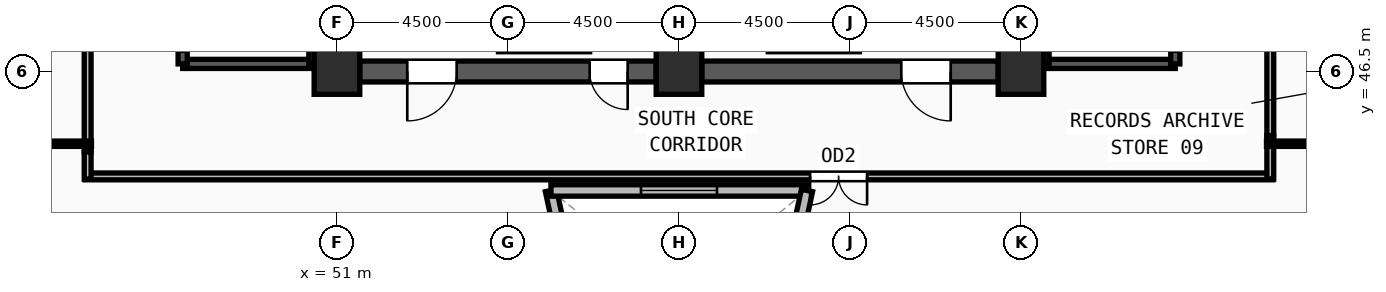
"""IFC4 building model, lengths in metres.
Left out: names, types, materials, properties, quantities, classifications, styles, units other than length and angle.
Written with IfcOpenShell. Run it as: python <this file> out.ifc"""

import sys

from ifc_helpers import new_model, si_unit, direction, frame, frame_2d, origin, origin_2d, place, context, subcontext, project, spatial, rectangle, extrude, source, transform, mapped, element, fill, save


model = new_model("IFC4")
c1 = context("Model", 3, precision=1e-05, world=origin(), true_north=direction((0.0, 1.0)))
c2 = subcontext(c1, "Body", "Model", "MODEL_VIEW")
j1 = project(units=[si_unit("LENGTHUNIT", "METRE"), si_unit("PLANEANGLEUNIT", "RADIAN")], contexts=[c1])
p1 = place(None, origin())
s1 = spatial("IfcSite", under=j1, at=p1, CompositionType="ELEMENT")
p2 = place(p1, origin())
s2 = spatial("IfcBuilding", under=s1, at=p2, CompositionType="ELEMENT")
p3 = place(p2, frame((0.0, 0.0, 328.5)))
s3 = spatial("IfcBuildingStorey", under=s2, at=p3, CompositionType="ELEMENT", Elevation=328.5)
m1 = source(origin(), c2, "Body", "SweptSolid", [
    extrude(rectangle(XDim=1.2, YDim=1.2, at=origin_2d()), origin(), (0.0, 0.0, 1.0), 3.75),
])
for number, where, z_axis, x_axis in (
    (1, (51.0, 46.5, 0.0), (0.0, 0.0, 1.0), (1.0, 0.0, 0.0)),
    (2, (60.0, 46.5, 0.0), (0.0, 0.0, 1.0), (1.0, 0.0, 0.0)),
    (3, (69.0, 46.5, 0.0), (0.0, 0.0, 1.0), (1.0, 0.0, 0.0)),
):
    element("IfcColumn", number, at=place(p3, frame(where, z_axis=z_axis, x_axis=x_axis)), inside=s3, PredefinedType="COLUMN", context=c2, shape_type="MappedRepresentation", body=[
        mapped(m1, transform((0.0, 0.0, 0.0), x_axis=(1.0, 0.0, 0.0), y_axis=(0.0, 1.0, 0.0), z_axis=(0.0, 0.0, 1.0), scale=1.0)),
    ])
p4 = place(p3, frame((40.566, 44.765, 0.0), z_axis=(0.0, 0.0, 1.0), x_axis=(0.558170282959, -0.829726421913, 0.0)))
e4 = element("IfcWall", 4, at=p4, inside=s3, PredefinedType="SOLIDWALL", context=c2, shape_type="SweptSolid", body=[
    extrude(rectangle(XDim=25.747, YDim=0.38, at=frame_2d((12.874, 0.0))), origin(), (0.0, 0.0, 1.0), 3.57),
])
m2 = source(origin(), c2, "Body", "SweptSolid", [
    extrude(rectangle(XDim=1.35, YDim=1.85, at=frame_2d((0.675, 0.925))), frame((0.0, 0.2, 0.0), z_axis=(0.0, -1.0, 0.0), x_axis=(1.0, 0.0, 0.0)), (0.0, 0.0, 1.0), 0.4),
])
p5 = place(p4, frame((5.762, 0.0, 0.55)))
e5 = element("IfcOpeningElement", 5, at=p5, cuts=e4, PredefinedType="OPENING", context=c2, shape_type="MappedRepresentation", body=[
    mapped(m2, transform((0.0, 0.0, 0.0), x_axis=(1.0, 0.0, 0.0), y_axis=(0.0, 1.0, 0.0), z_axis=(0.0, 0.0, 1.0), scale=1.0)),
])
p6 = place(p4, frame((12.198, 0.0, 0.55)))
e6 = element("IfcOpeningElement", 6, at=p6, cuts=e4, PredefinedType="OPENING", context=c2, shape_type="MappedRepresentation", body=[
    mapped(m2, transform((0.0, 0.0, 0.0), x_axis=(1.0, 0.0, 0.0), y_axis=(0.0, 1.0, 0.0), z_axis=(0.0, 0.0, 1.0), scale=1.0)),
])
p7 = place(p4, frame((18.635, 0.0, 0.55)))
e7 = element("IfcOpeningElement", 7, at=p7, cuts=e4, PredefinedType="OPENING", context=c2, shape_type="MappedRepresentation", body=[
    mapped(m2, transform((0.0, 0.0, 0.0), x_axis=(1.0, 0.0, 0.0), y_axis=(0.0, 1.0, 0.0), z_axis=(0.0, 0.0, 1.0), scale=1.0)),
])
p8 = place(p3, frame((68.4, 46.5, 0.0), z_axis=(0.0, 0.0, 1.0), x_axis=(-1.0, 0.0, 0.0)))
e8 = element("IfcWall", 8, at=p8, inside=s3, PredefinedType="SHEAR", context=c2, shape_type="SweptSolid", body=[
    extrude(rectangle(XDim=7.8, YDim=0.55, at=frame_2d((3.9, 0.0))), origin(), (0.0, 0.0, 1.0), 3.57),
])
m3 = source(origin(), c2, "Body", "SweptSolid", [
    extrude(rectangle(XDim=1.3, YDim=2.2, at=frame_2d((0.65, 1.1))), frame((0.0, 0.285, 0.0), z_axis=(0.0, -1.0, 0.0), x_axis=(1.0, 0.0, 0.0)), (0.0, 0.0, 1.0), 0.57),
])
p9 = place(p8, frame((1.25, 0.0, 0.0)))
e9 = element("IfcOpeningElement", 9, at=p9, cuts=e8, PredefinedType="OPENING", context=c2, shape_type="MappedRepresentation", body=[
    mapped(m3, transform((0.0, 0.0, 0.0), x_axis=(1.0, 0.0, 0.0), y_axis=(0.0, 1.0, 0.0), z_axis=(0.0, 0.0, 1.0), scale=1.0)),
])
p10 = place(p3, frame((59.4, 46.5, 0.0), z_axis=(0.0, 0.0, 1.0), x_axis=(-1.0, 0.0, 0.0)))
e10 = element("IfcWall", 10, at=p10, inside=s3, PredefinedType="SHEAR", context=c2, shape_type="SweptSolid", body=[
    extrude(rectangle(XDim=7.8, YDim=0.55, at=frame_2d((3.9, 0.0))), origin(), (0.0, 0.0, 1.0), 3.57),
])
p11 = place(p10, frame((5.25, 0.0, 0.0)))
e11 = element("IfcOpeningElement", 11, at=p11, cuts=e10, PredefinedType="OPENING", context=c2, shape_type="MappedRepresentation", body=[
    mapped(m3, transform((0.0, 0.0, 0.0), x_axis=(1.0, 0.0, 0.0), y_axis=(0.0, 1.0, 0.0), z_axis=(0.0, 0.0, 1.0), scale=1.0)),
])
m4 = source(origin(), c2, "Body", "SweptSolid", [
    extrude(rectangle(XDim=1.0, YDim=2.2, at=frame_2d((0.5, 1.1))), frame((0.0, 0.285, 0.0), z_axis=(0.0, -1.0, 0.0), x_axis=(1.0, 0.0, 0.0)), (0.0, 0.0, 1.0), 0.57),
])
p12 = place(p10, frame((0.75, 0.0, 0.0)))
e12 = element("IfcOpeningElement", 12, at=p12, cuts=e10, PredefinedType="OPENING", context=c2, shape_type="MappedRepresentation", body=[
    mapped(m4, transform((0.0, 0.0, 0.0), x_axis=(1.0, 0.0, 0.0), y_axis=(0.0, 1.0, 0.0), z_axis=(0.0, 0.0, 1.0), scale=1.0)),
])
p13 = place(p3, frame((46.94, 46.7, 0.0), z_axis=(0.0, 0.0, 1.0), x_axis=(1.0, 0.0, 0.0)))
e13 = element("IfcWall", 13, at=p13, inside=s3, PredefinedType="SOLIDWALL", context=c2, shape_type="SweptSolid", body=[
    extrude(rectangle(XDim=3.44, YDim=0.24, at=frame_2d((1.72, 0.0))), origin(), (0.0, 0.0, 1.0), 3.57),
])
p14 = place(p3, frame((50.38, 46.7, 0.0), z_axis=(0.0, 0.0, 1.0), x_axis=(0.0, 1.0, 0.0)))
e14 = element("IfcWall", 14, at=p14, inside=s3, PredefinedType="SOLIDWALL", context=c2, shape_type="SweptSolid", body=[
    extrude(rectangle(XDim=7.82, YDim=0.24, at=frame_2d((3.91, 0.0))), origin(), (0.0, 0.0, 1.0), 3.57),
])
p15 = place(p3, frame((46.94, 54.52, 0.0), z_axis=(0.0, 0.0, 1.0), x_axis=(0.0, -1.0, 0.0)))
e15 = element("IfcWall", 15, at=p15, inside=s3, PredefinedType="SOLIDWALL", context=c2, shape_type="SweptSolid", body=[
    extrude(rectangle(XDim=7.82, YDim=0.24, at=frame_2d((3.91, 0.0))), origin(), (0.0, 0.0, 1.0), 3.57),
])
m5 = source(origin(), c2, "Body", "SweptSolid", [
    extrude(rectangle(XDim=1.2, YDim=2.2, at=frame_2d((0.6, 1.1))), frame((0.0, 0.13, 0.0), z_axis=(0.0, -1.0, 0.0), x_axis=(1.0, 0.0, 0.0)), (0.0, 0.0, 1.0), 0.26),
])
p16 = place(p15, frame((6.3, 0.0, 0.0)))
e16 = element("IfcOpeningElement", 16, at=p16, cuts=e15, PredefinedType="OPENING", context=c2, shape_type="MappedRepresentation", body=[
    mapped(m5, transform((0.0, 0.0, 0.0), x_axis=(1.0, 0.0, 0.0), y_axis=(0.0, 1.0, 0.0), z_axis=(0.0, 0.0, 1.0), scale=1.0)),
])
p17 = place(p3, frame((69.62, 46.7, 0.0), z_axis=(0.0, 0.0, 1.0), x_axis=(1.0, 0.0, 0.0)))
e17 = element("IfcWall", 17, at=p17, inside=s3, PredefinedType="SOLIDWALL", context=c2, shape_type="SweptSolid", body=[
    extrude(rectangle(XDim=3.44, YDim=0.24, at=frame_2d((1.72, 0.0))), origin(), (0.0, 0.0, 1.0), 3.57),
])
p18 = place(p3, frame((73.06, 46.7, 0.0), z_axis=(0.0, 0.0, 1.0), x_axis=(0.0, 1.0, 0.0)))
e18 = element("IfcWall", 18, at=p18, inside=s3, PredefinedType="SOLIDWALL", context=c2, shape_type="SweptSolid", body=[
    extrude(rectangle(XDim=7.82, YDim=0.24, at=frame_2d((3.91, 0.0))), origin(), (0.0, 0.0, 1.0), 3.57),
])
p19 = place(p18, frame((0.32, 0.0, 0.0)))
e19 = element("IfcOpeningElement", 19, at=p19, cuts=e18, PredefinedType="OPENING", context=c2, shape_type="MappedRepresentation", body=[
    mapped(m5, transform((0.0, 0.0, 0.0), x_axis=(1.0, 0.0, 0.0), y_axis=(0.0, 1.0, 0.0), z_axis=(0.0, 0.0, 1.0), scale=1.0)),
])
p20 = place(p3, frame((69.62, 54.52, 0.0), z_axis=(0.0, 0.0, 1.0), x_axis=(0.0, -1.0, 0.0)))
e20 = element("IfcWall", 20, at=p20, inside=s3, PredefinedType="SOLIDWALL", context=c2, shape_type="SweptSolid", body=[
    extrude(rectangle(XDim=7.82, YDim=0.24, at=frame_2d((3.91, 0.0))), origin(), (0.0, 0.0, 1.0), 3.57),
])
p21 = place(p3, frame((57.81, 37.916, 0.0), z_axis=(0.0, 0.0, 1.0), x_axis=(-0.211279697176, 0.977425644006, 0.0)))
e21 = element("IfcWall", 21, at=p21, inside=s3, PredefinedType="SOLIDWALL", context=c2, shape_type="SweptSolid", body=[
    extrude(rectangle(XDim=5.58, YDim=0.3, at=frame_2d((2.79, 0.0))), origin(), (0.0, 0.0, 1.0), 3.57),
])
m6 = source(origin(), c2, "Body", "SweptSolid", [
    extrude(rectangle(XDim=2.0, YDim=1.9, at=frame_2d((1.0, 0.95))), frame((0.0, 0.16, 0.0), z_axis=(0.0, -1.0, 0.0), x_axis=(1.0, 0.0, 0.0)), (0.0, 0.0, 1.0), 0.32),
])
p22 = place(p21, frame((1.79, 0.0, 0.55)))
e22 = element("IfcOpeningElement", 22, at=p22, cuts=e21, PredefinedType="OPENING", context=c2, shape_type="MappedRepresentation", body=[
    mapped(m6, transform((0.0, 0.0, 0.0), x_axis=(1.0, 0.0, 0.0), y_axis=(0.0, 1.0, 0.0), z_axis=(0.0, 0.0, 1.0), scale=1.0)),
])
p23 = place(p3, frame((56.631, 43.37, 0.0), z_axis=(0.0, 0.0, 1.0), x_axis=(1.0, 0.0, 0.0)))
e23 = element("IfcWall", 23, at=p23, inside=s3, PredefinedType="SOLIDWALL", context=c2, shape_type="SweptSolid", body=[
    extrude(rectangle(XDim=6.738, YDim=0.3, at=frame_2d((3.369, 0.0))), origin(), (0.0, 0.0, 1.0), 3.57),
])
p24 = place(p23, frame((2.369, 0.0, 0.55)))
e24 = element("IfcOpeningElement", 24, at=p24, cuts=e23, PredefinedType="OPENING", context=c2, shape_type="MappedRepresentation", body=[
    mapped(m6, transform((0.0, 0.0, 0.0), x_axis=(1.0, 0.0, 0.0), y_axis=(0.0, 1.0, 0.0), z_axis=(0.0, 0.0, 1.0), scale=1.0)),
])
p25 = place(p3, frame((63.369, 43.37, 0.0), z_axis=(0.0, 0.0, 1.0), x_axis=(-0.211279697176, -0.977425644006, 0.0)))
e25 = element("IfcWall", 25, at=p25, inside=s3, PredefinedType="SOLIDWALL", context=c2, shape_type="SweptSolid", body=[
    extrude(rectangle(XDim=5.58, YDim=0.3, at=frame_2d((2.79, 0.0))), origin(), (0.0, 0.0, 1.0), 3.57),
])
p26 = place(p25, frame((1.79, 0.0, 0.55)))
e26 = element("IfcOpeningElement", 26, at=p26, cuts=e25, PredefinedType="OPENING", context=c2, shape_type="MappedRepresentation", body=[
    mapped(m6, transform((0.0, 0.0, 0.0), x_axis=(1.0, 0.0, 0.0), y_axis=(0.0, 1.0, 0.0), z_axis=(0.0, 0.0, 1.0), scale=1.0)),
])
p27 = place(p3, frame((75.63, 43.74, 0.0), z_axis=(0.0, 0.0, 1.0), x_axis=(-1.0, 0.0, 0.0)))
e27 = element("IfcWall", 27, at=p27, inside=s3, PredefinedType="PARTITIONING", context=c2, shape_type="SweptSolid", body=[
    extrude(rectangle(XDim=31.26, YDim=0.18, at=frame_2d((15.63, 0.0))), origin(), (0.0, 0.0, 1.0), 3.57),
])
m7 = source(origin(), c2, "Body", "SweptSolid", [
    extrude(rectangle(XDim=1.5, YDim=2.2, at=frame_2d((0.75, 1.1))), frame((0.0, 0.1, 0.0), z_axis=(0.0, -1.0, 0.0), x_axis=(1.0, 0.0, 0.0)), (0.0, 0.0, 1.0), 0.2),
])
p28 = place(p27, frame((10.68, 0.0, 0.0)))
e28 = element("IfcOpeningElement", 28, at=p28, cuts=e27, PredefinedType="OPENING", context=c2, shape_type="MappedRepresentation", body=[
    mapped(m7, transform((0.0, 0.0, 0.0), x_axis=(1.0, 0.0, 0.0), y_axis=(0.0, 1.0, 0.0), z_axis=(0.0, 0.0, 1.0), scale=1.0)),
])
p29 = place(p3, frame((44.44, 44.385, 0.0), z_axis=(0.0, 0.0, 1.0), x_axis=(0.0, 1.0, 0.0)))
e29 = element("IfcWall", 29, at=p29, inside=s3, PredefinedType="PARTITIONING", context=c2, shape_type="SweptSolid", body=[
    extrude(rectangle(XDim=2.955, YDim=0.18, at=frame_2d((1.478, 0.0))), origin(), (0.0, 0.0, 1.0), 3.57),
])
p30 = place(p3, frame((44.44, 43.67, 0.0), z_axis=(0.0, 0.0, 1.0), x_axis=(0.0, 1.0, 0.0)))
e30 = element("IfcWall", 30, at=p30, inside=s3, PredefinedType="PARTITIONING", context=c2, shape_type="SweptSolid", body=[
    extrude(rectangle(XDim=0.715, YDim=0.18, at=frame_2d((0.357, 0.0))), origin(), (0.0, 0.0, 1.0), 3.57),
])
p31 = place(p3, frame((75.56, 44.815, 0.0), z_axis=(0.0, 0.0, 1.0), x_axis=(0.0, -1.0, 0.0)))
e31 = element("IfcWall", 31, at=p31, inside=s3, PredefinedType="PARTITIONING", context=c2, shape_type="SweptSolid", body=[
    extrude(rectangle(XDim=1.145, YDim=0.18, at=frame_2d((0.573, 0.0))), origin(), (0.0, 0.0, 1.0), 3.57),
])
p32 = place(p3, frame((75.56, 48.21, 0.0), z_axis=(0.0, 0.0, 1.0), x_axis=(0.0, -1.0, 0.0)))
e32 = element("IfcWall", 32, at=p32, inside=s3, PredefinedType="PARTITIONING", context=c2, shape_type="SweptSolid", body=[
    extrude(rectangle(XDim=3.395, YDim=0.18, at=frame_2d((1.698, 0.0))), origin(), (0.0, 0.0, 1.0), 3.57),
])
p33 = place(p3, frame((44.54, 44.6, 0.0), z_axis=(0.0, 0.0, 1.0), x_axis=(-1.0, 0.0, 0.0)))
e33 = element("IfcWall", 33, at=p33, inside=s3, PredefinedType="PARTITIONING", context=c2, shape_type="SweptSolid", body=[
    extrude(rectangle(XDim=4.622, YDim=0.14, at=frame_2d((2.311, 0.0))), origin(), (0.0, 0.0, 1.0), 3.57),
])
p34 = place(p3, frame((75.46, 44.6, 0.0), z_axis=(0.0, 0.0, 1.0), x_axis=(1.0, 0.0, 0.0)))
e34 = element("IfcWall", 34, at=p34, inside=s3, PredefinedType="PARTITIONING", context=c2, shape_type="SweptSolid", body=[
    extrude(rectangle(XDim=4.332, YDim=0.14, at=frame_2d((2.166, 0.0))), origin(), (0.0, 0.0, 1.0), 3.57),
])
m8 = source(origin(), c2, "Body", "SweptSolid", [
    extrude(rectangle(XDim=1.3, YDim=2.2, at=frame_2d((0.65, 1.1))), frame((0.0, 0.025, 0.0), z_axis=(0.0, -1.0, 0.0), x_axis=(1.0, 0.0, 0.0)), (0.0, 0.0, 1.0), 0.05),
])
p35 = place(p11, origin())
e35 = element("IfcDoor", 35, at=p35, inside=s3, OperationType="SINGLE_SWING_RIGHT", PredefinedType="DOOR", context=c2, shape_type="MappedRepresentation", body=[
    mapped(m8, transform((0.0, 0.0, 0.0), x_axis=(1.0, 0.0, 0.0), y_axis=(0.0, 1.0, 0.0), z_axis=(0.0, 0.0, 1.0), scale=1.0)),
])
fill(e11, e35)
m9 = source(origin(), c2, "Body", "SweptSolid", [
    extrude(rectangle(XDim=1.0, YDim=2.2, at=frame_2d((0.5, 1.1))), frame((0.0, 0.025, 0.0), z_axis=(0.0, -1.0, 0.0), x_axis=(1.0, 0.0, 0.0)), (0.0, 0.0, 1.0), 0.05),
])
p36 = place(p12, origin())
e36 = element("IfcDoor", 36, at=p36, inside=s3, OperationType="SINGLE_SWING_LEFT", PredefinedType="DOOR", context=c2, shape_type="MappedRepresentation", body=[
    mapped(m9, transform((0.0, 0.0, 0.0), x_axis=(1.0, 0.0, 0.0), y_axis=(0.0, 1.0, 0.0), z_axis=(0.0, 0.0, 1.0), scale=1.0)),
])
fill(e12, e36)
p37 = place(p9, origin())
e37 = element("IfcDoor", 37, at=p37, inside=s3, OperationType="SINGLE_SWING_LEFT", PredefinedType="DOOR", context=c2, shape_type="MappedRepresentation", body=[
    mapped(m8, transform((0.0, 0.0, 0.0), x_axis=(1.0, 0.0, 0.0), y_axis=(0.0, 1.0, 0.0), z_axis=(0.0, 0.0, 1.0), scale=1.0)),
])
fill(e9, e37)
m10 = source(origin(), c2, "Body", "SweptSolid", [
    extrude(rectangle(XDim=2.0, YDim=1.9, at=frame_2d((1.0, 0.95))), frame((0.0, 0.03, 0.0), z_axis=(0.0, -1.0, 0.0), x_axis=(1.0, 0.0, 0.0)), (0.0, 0.0, 1.0), 0.06),
])
p38 = place(p24, origin())
e38 = element("IfcWindow", 38, at=p38, inside=s3, PartitioningType="DOUBLE_PANEL_VERTICAL", PredefinedType="WINDOW", context=c2, shape_type="MappedRepresentation", body=[
    mapped(m10, transform((0.0, 0.0, 0.0), x_axis=(1.0, 0.0, 0.0), y_axis=(0.0, 1.0, 0.0), z_axis=(0.0, 0.0, 1.0), scale=1.0)),
])
fill(e24, e38)
m11 = source(origin(), c2, "Body", "SweptSolid", [
    extrude(rectangle(XDim=1.5, YDim=2.2, at=frame_2d((0.75, 1.1))), frame((0.0, 0.025, 0.0), z_axis=(0.0, -1.0, 0.0), x_axis=(1.0, 0.0, 0.0)), (0.0, 0.0, 1.0), 0.05),
])
p39 = place(p28, origin())
e39 = element("IfcDoor", 39, at=p39, inside=s3, OperationType="DOUBLE_DOOR_SINGLE_SWING", PredefinedType="DOOR", context=c2, shape_type="MappedRepresentation", body=[
    mapped(m11, transform((0.0, 0.0, 0.0), x_axis=(1.0, 0.0, 0.0), y_axis=(0.0, 1.0, 0.0), z_axis=(0.0, 0.0, 1.0), scale=1.0)),
])
fill(e28, e39)
save(model, sys.argv[1])
